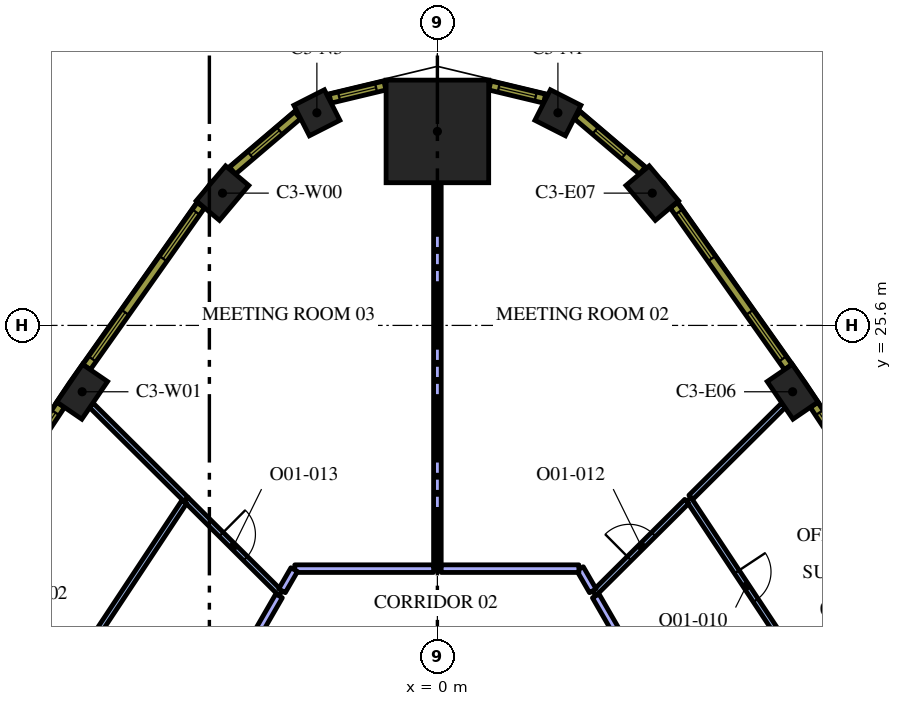
"""IFC4 building model, lengths in metres.
Left out: names, types, materials, properties, quantities, classifications, styles, units other than length and angle.
Written with IfcOpenShell. Run it as: python <this file> out.ifc"""

import sys

from ifc_helpers import new_model, si_unit, direction, frame, frame_2d, origin, origin_2d, place, context, subcontext, project, spatial, rectangle, extrude, element, fill, save


model = new_model("IFC4")
c1 = context("Model", 3, precision=1e-05, world=origin(), true_north=direction((0.0, 1.0)))
c2 = subcontext(c1, "Body", "Model", "MODEL_VIEW")
j1 = project(units=[si_unit("LENGTHUNIT", "METRE"), si_unit("PLANEANGLEUNIT", "RADIAN")], contexts=[c1])
p1 = place(None, origin())
s1 = spatial("IfcSite", under=j1, at=p1, CompositionType="ELEMENT")
p2 = place(p1, origin())
s2 = spatial("IfcBuilding", under=s1, at=p2, CompositionType="ELEMENT")
p3 = place(p2, frame((0.0, 0.0, 150.0)))
s3 = spatial("IfcBuildingStorey", under=s2, at=p3, CompositionType="ELEMENT", Elevation=150.0)
p4 = place(p3, frame((0.0, 30.704, 0.0), z_axis=(0.0, 0.0, 1.0), x_axis=(0.0, 1.0, 0.0)))
e1 = element("IfcColumn", 1, at=p4, inside=s3, PredefinedType="COLUMN", context=c2, shape_type="SweptSolid", body=[
    extrude(rectangle(XDim=2.7, YDim=2.7, at=origin_2d()), origin(), (0.0, 0.0, 1.0), 4.2),
])
for number, where, z_axis, x_axis in (
    (2, (9.348, 23.854, 0.0), (0.0, 0.0, 1.0), (-0.565, 0.825, 0.0)),
    (3, (5.654, 29.081, 0.0), (0.0, 0.0, 1.0), (-0.644, 0.765, 0.0)),
):
    element("IfcColumn", number, at=place(p3, frame(where, z_axis=z_axis, x_axis=x_axis)), inside=s3, PredefinedType="COLUMN", context=c2, shape_type="SweptSolid", body=[
        extrude(rectangle(XDim=1.2, YDim=0.8, at=origin_2d()), origin(), (0.0, 0.0, 1.0), 4.2),
    ])
for number, where, z_axis, x_axis in (
    (4, (3.171, 31.195, 0.0), (0.0, 0.0, 1.0), (-0.891, 0.453, 0.0)),
    (5, (-3.171, 31.195, 0.0), (0.0, 0.0, 1.0), (-0.891, -0.453, 0.0)),
):
    element("IfcColumn", number, at=place(p3, frame(where, z_axis=z_axis, x_axis=x_axis)), inside=s3, PredefinedType="COLUMN", context=c2, shape_type="SweptSolid", body=[
        extrude(rectangle(XDim=0.9, YDim=0.9, at=origin_2d()), origin(), (0.0, 0.0, 1.0), 4.2),
    ])
for number, where, z_axis, x_axis in (
    (6, (-5.654, 29.081, 0.0), (0.0, 0.0, 1.0), (-0.644, -0.765, 0.0)),
    (7, (-9.348, 23.854, 0.0), (0.0, 0.0, 1.0), (-0.565, -0.825, 0.0)),
):
    element("IfcColumn", number, at=place(p3, frame(where, z_axis=z_axis, x_axis=x_axis)), inside=s3, PredefinedType="COLUMN", context=c2, shape_type="SweptSolid", body=[
        extrude(rectangle(XDim=1.2, YDim=0.8, at=origin_2d()), origin(), (0.0, 0.0, 1.0), 4.2),
    ])
p5 = place(p3, frame((6.616, 21.024, 0.0), z_axis=(0.0, 0.0, 1.0), x_axis=(0.551915124006, -0.833900291338, 0.0)))
e8 = element("IfcWall", 8, at=p5, inside=s3, PredefinedType="PARTITIONING", context=c2, shape_type="SweptSolid", body=[
    extrude(rectangle(XDim=5.488, YDim=0.15, at=frame_2d((2.744, 0.0))), origin(), (0.0, 0.0, 1.0), 3.15),
])
p6 = place(p5, frame((2.288, 0.0, 0.0)))
e9 = element("IfcOpeningElement", 9, at=p6, cuts=e8, PredefinedType="OPENING", context=c2, shape_type="SweptSolid", body=[
    extrude(rectangle(XDim=0.9, YDim=2.1, at=frame_2d((0.45, 1.05))), frame((0.0, 0.085, 0.0), z_axis=(0.0, -1.0, 0.0), x_axis=(1.0, 0.0, 0.0)), (0.0, 0.0, 1.0), 0.17),
])
p7 = place(p3, frame((6.67, 21.078, 0.0), z_axis=(0.0, 0.0, 1.0), x_axis=(0.709236178776, 0.704970951681, 0.0)))
e10 = element("IfcWall", 10, at=p7, inside=s3, PredefinedType="PARTITIONING", context=c2, shape_type="SweptSolid", body=[
    extrude(rectangle(XDim=3.434, YDim=0.15, at=frame_2d((1.717, 0.0))), origin(), (0.0, 0.0, 1.0), 3.15),
])
p8 = place(p3, frame((4.128, 18.55, 0.0), z_axis=(0.0, 0.0, 1.0), x_axis=(0.709237676072, 0.704969445324, 0.0)))
e11 = element("IfcWall", 11, at=p8, inside=s3, PredefinedType="PARTITIONING", context=c2, shape_type="SweptSolid", body=[
    extrude(rectangle(XDim=3.432, YDim=0.15, at=frame_2d((1.716, 0.0))), origin(), (0.0, 0.0, 1.0), 3.15),
])
p9 = place(p8, frame((1.3, 0.0, 0.0)))
e12 = element("IfcOpeningElement", 12, at=p9, cuts=e11, PredefinedType="OPENING", context=c2, shape_type="SweptSolid", body=[
    extrude(rectangle(XDim=0.9, YDim=2.1, at=frame_2d((0.45, 1.05))), frame((0.0, 0.085, 0.0), z_axis=(0.0, -1.0, 0.0), x_axis=(1.0, 0.0, 0.0)), (0.0, 0.0, 1.0), 0.17),
])
p10 = place(p3, frame((8.611, 10.785, 0.0), z_axis=(0.0, 0.0, 1.0), x_axis=(-0.499987928593, 0.866032373102, 0.0)))
e13 = element("IfcWall", 13, at=p10, inside=s3, PredefinedType="PARTITIONING", context=c2, shape_type="SweptSolid", body=[
    extrude(rectangle(XDim=8.889, YDim=0.2, at=frame_2d((4.445, 0.0))), origin(), (0.0, 0.0, 1.0), 3.15),
])
p11 = place(p3, frame((0.0, 19.2, 0.0), z_axis=(0.0, 0.0, 1.0), x_axis=(0.0, 1.0, 0.0)))
e14 = element("IfcWall", 14, at=p11, inside=s3, PredefinedType="PARTITIONING", context=c2, shape_type="SweptSolid", body=[
    extrude(rectangle(XDim=10.154, YDim=0.2, at=frame_2d((5.077, 0.0))), origin(), (0.0, 0.0, 1.0), 3.15),
])
p12 = place(p3, frame((4.089, 18.617, 0.0), z_axis=(0.0, 0.0, 1.0), x_axis=(-0.500120377296, 0.865955892764, 0.0)))
e15 = element("IfcWall", 15, at=p12, inside=s3, PredefinedType="PARTITIONING", context=c2, shape_type="SweptSolid", body=[
    extrude(rectangle(XDim=0.673, YDim=0.2, at=frame_2d((0.336, 0.0))), origin(), (0.0, 0.0, 1.0), 3.15),
])
p13 = place(p3, frame((3.723, 19.2, 0.0), z_axis=(0.0, 0.0, 1.0), x_axis=(-1.0, 0.0, 0.0)))
e16 = element("IfcWall", 16, at=p13, inside=s3, PredefinedType="PARTITIONING", context=c2, shape_type="SweptSolid", body=[
    extrude(rectangle(XDim=3.623, YDim=0.2, at=frame_2d((1.812, 0.0))), origin(), (0.0, 0.0, 1.0), 3.15),
])
p14 = place(p3, frame((-6.613, 21.021, 0.0), z_axis=(0.0, 0.0, 1.0), x_axis=(-0.709222036241, 0.704985179497, 0.0)))
e17 = element("IfcWall", 17, at=p14, inside=s3, PredefinedType="PARTITIONING", context=c2, shape_type="SweptSolid", body=[
    extrude(rectangle(XDim=3.515, YDim=0.15, at=frame_2d((1.757, 0.0))), origin(), (0.0, 0.0, 1.0), 3.15),
])
p15 = place(p3, frame((-6.619, 21.027, 0.0), z_axis=(0.0, 0.0, 1.0), x_axis=(0.709188943058, -0.705018470002, 0.0)))
e18 = element("IfcWall", 18, at=p15, inside=s3, PredefinedType="PARTITIONING", context=c2, shape_type="SweptSolid", body=[
    extrude(rectangle(XDim=3.512, YDim=0.15, at=frame_2d((1.756, 0.0))), origin(), (0.0, 0.0, 1.0), 3.15),
])
p16 = place(p15, frame((1.312, 0.0, 0.0)))
e19 = element("IfcOpeningElement", 19, at=p16, cuts=e18, PredefinedType="OPENING", context=c2, shape_type="SweptSolid", body=[
    extrude(rectangle(XDim=0.9, YDim=2.1, at=frame_2d((0.45, 1.05))), frame((0.0, 0.085, 0.0), z_axis=(0.0, -1.0, 0.0), x_axis=(1.0, 0.0, 0.0)), (0.0, 0.0, 1.0), 0.17),
])
p17 = place(p3, frame((-0.1, 19.2, 0.0), z_axis=(0.0, 0.0, 1.0), x_axis=(-1.0, 0.0, 0.0)))
e20 = element("IfcWall", 20, at=p17, inside=s3, PredefinedType="PARTITIONING", context=c2, shape_type="SweptSolid", body=[
    extrude(rectangle(XDim=3.653, YDim=0.2, at=frame_2d((1.826, 0.0))), origin(), (0.0, 0.0, 1.0), 3.15),
])
p18 = place(p3, frame((-3.768, 19.174, 0.0), z_axis=(0.0, 0.0, 1.0), x_axis=(-0.499897828833, -0.8660843843, 0.0)))
e21 = element("IfcWall", 21, at=p18, inside=s3, PredefinedType="PARTITIONING", context=c2, shape_type="SweptSolid", body=[
    extrude(rectangle(XDim=0.643, YDim=0.2, at=frame_2d((0.321, 0.0))), origin(), (0.0, 0.0, 1.0), 3.15),
])
p19 = place(p3, frame((-6.658, 20.96, 0.0), z_axis=(0.0, 0.0, 1.0), x_axis=(-0.551907039463, -0.833905642019, 0.0)))
e22 = element("IfcWall", 22, at=p19, inside=s3, PredefinedType="PARTITIONING", context=c2, shape_type="SweptSolid", body=[
    extrude(rectangle(XDim=5.412, YDim=0.15, at=frame_2d((2.706, 0.0))), origin(), (0.0, 0.0, 1.0), 3.15),
])
p20 = place(p3, frame((-4.167, 18.483, 0.0), z_axis=(0.0, 0.0, 1.0), x_axis=(-0.499974340325, -0.866040217898, 0.0)))
e23 = element("IfcWall", 23, at=p20, inside=s3, PredefinedType="PARTITIONING", context=c2, shape_type="SweptSolid", body=[
    extrude(rectangle(XDim=8.894, YDim=0.2, at=frame_2d((4.447, 0.0))), origin(), (0.0, 0.0, 1.0), 3.15),
])
p21 = place(p3, frame((12.783, 19.171, 0.0), z_axis=(0.0, 0.0, 1.0), x_axis=(-0.551892811511, 0.833915058386, 0.0)))
e24 = element("IfcWall", 24, at=p21, inside=s3, PredefinedType="SOLIDWALL", context=c2, shape_type="SweptSolid", body=[
    extrude(rectangle(XDim=5.204, YDim=0.24, at=frame_2d((2.602, 0.0))), origin(), (0.0, 0.0, 1.0), 3.95),
])
p22 = place(p21, frame((0.248, 0.0, 0.9)))
e25 = element("IfcOpeningElement", 25, at=p22, cuts=e24, PredefinedType="OPENING", context=c2, shape_type="SweptSolid", body=[
    extrude(rectangle(XDim=1.5, YDim=2.55, at=frame_2d((0.75, 1.275))), frame((0.0, 0.13, 0.0), z_axis=(0.0, -1.0, 0.0), x_axis=(1.0, 0.0, 0.0)), (0.0, 0.0, 1.0), 0.26),
])
p23 = place(p21, frame((3.455, 0.0, 0.9)))
e26 = element("IfcOpeningElement", 26, at=p23, cuts=e24, PredefinedType="OPENING", context=c2, shape_type="SweptSolid", body=[
    extrude(rectangle(XDim=1.5, YDim=2.55, at=frame_2d((0.75, 1.275))), frame((0.0, 0.13, 0.0), z_axis=(0.0, -1.0, 0.0), x_axis=(1.0, 0.0, 0.0)), (0.0, 0.0, 1.0), 0.26),
])
p24 = place(p3, frame((9.231, 24.504, 0.0), z_axis=(0.0, 0.0, 1.0), x_axis=(-0.577115207679, 0.816662743772, 0.0)))
e27 = element("IfcWall", 27, at=p24, inside=s3, PredefinedType="SOLIDWALL", context=c2, shape_type="SweptSolid", body=[
    extrude(rectangle(XDim=5.213, YDim=0.24, at=frame_2d((2.606, 0.0))), origin(), (0.0, 0.0, 1.0), 3.95),
])
p25 = place(p24, frame((0.261, 0.0, 0.9)))
e28 = element("IfcOpeningElement", 28, at=p25, cuts=e27, PredefinedType="OPENING", context=c2, shape_type="SweptSolid", body=[
    extrude(rectangle(XDim=1.5, YDim=2.55, at=frame_2d((0.75, 1.275))), frame((0.0, 0.13, 0.0), z_axis=(0.0, -1.0, 0.0), x_axis=(1.0, 0.0, 0.0)), (0.0, 0.0, 1.0), 0.26),
])
p26 = place(p24, frame((3.492, 0.0, 0.9)))
e29 = element("IfcOpeningElement", 29, at=p26, cuts=e27, PredefinedType="OPENING", context=c2, shape_type="SweptSolid", body=[
    extrude(rectangle(XDim=1.5, YDim=2.55, at=frame_2d((0.75, 1.275))), frame((0.0, 0.13, 0.0), z_axis=(0.0, -1.0, 0.0), x_axis=(1.0, 0.0, 0.0)), (0.0, 0.0, 1.0), 0.26),
])
p27 = place(p3, frame((5.392, 29.672, 0.0), z_axis=(0.0, 0.0, 1.0), x_axis=(-0.761419744247, 0.648259186645, 0.0)))
e30 = element("IfcWall", 30, at=p27, inside=s3, PredefinedType="SOLIDWALL", context=c2, shape_type="SweptSolid", body=[
    extrude(rectangle(XDim=2.25, YDim=0.24, at=frame_2d((1.125, 0.0))), origin(), (0.0, 0.0, 1.0), 3.95),
])
p28 = place(p27, frame((0.625, 0.0, 0.9)))
e31 = element("IfcOpeningElement", 31, at=p28, cuts=e30, PredefinedType="OPENING", context=c2, shape_type="SweptSolid", body=[
    extrude(rectangle(XDim=1.0, YDim=2.55, at=frame_2d((0.5, 1.275))), frame((0.0, 0.13, 0.0), z_axis=(0.0, -1.0, 0.0), x_axis=(1.0, 0.0, 0.0)), (0.0, 0.0, 1.0), 0.26),
])
p29 = place(p3, frame((2.821, 31.566, 0.0), z_axis=(0.0, 0.0, 1.0), x_axis=(-0.972479955788, 0.232986556673, 0.0)))
e32 = element("IfcWall", 32, at=p29, inside=s3, PredefinedType="SOLIDWALL", context=c2, shape_type="SweptSolid", body=[
    extrude(rectangle(XDim=1.482, YDim=0.24, at=frame_2d((0.741, 0.0))), origin(), (0.0, 0.0, 1.0), 3.95),
])
p30 = place(p29, frame((0.241, 0.0, 0.9)))
e33 = element("IfcOpeningElement", 33, at=p30, cuts=e32, PredefinedType="OPENING", context=c2, shape_type="SweptSolid", body=[
    extrude(rectangle(XDim=1.0, YDim=2.55, at=frame_2d((0.5, 1.275))), frame((0.0, 0.13, 0.0), z_axis=(0.0, -1.0, 0.0), x_axis=(1.0, 0.0, 0.0)), (0.0, 0.0, 1.0), 0.26),
])
p31 = place(p3, frame((-1.38, 31.912, 0.0), z_axis=(0.0, 0.0, 1.0), x_axis=(-0.972479955788, -0.232986556673, 0.0)))
e34 = element("IfcWall", 34, at=p31, inside=s3, PredefinedType="SOLIDWALL", context=c2, shape_type="SweptSolid", body=[
    extrude(rectangle(XDim=1.482, YDim=0.24, at=frame_2d((0.741, 0.0))), origin(), (0.0, 0.0, 1.0), 3.95),
])
p32 = place(p31, frame((0.241, 0.0, 0.9)))
e35 = element("IfcOpeningElement", 35, at=p32, cuts=e34, PredefinedType="OPENING", context=c2, shape_type="SweptSolid", body=[
    extrude(rectangle(XDim=1.0, YDim=2.55, at=frame_2d((0.5, 1.275))), frame((0.0, 0.13, 0.0), z_axis=(0.0, -1.0, 0.0), x_axis=(1.0, 0.0, 0.0)), (0.0, 0.0, 1.0), 0.26),
])
p33 = place(p3, frame((-3.678, 31.131, 0.0), z_axis=(0.0, 0.0, 1.0), x_axis=(-0.761419744247, -0.648259186645, 0.0)))
e36 = element("IfcWall", 36, at=p33, inside=s3, PredefinedType="SOLIDWALL", context=c2, shape_type="SweptSolid", body=[
    extrude(rectangle(XDim=2.25, YDim=0.24, at=frame_2d((1.125, 0.0))), origin(), (0.0, 0.0, 1.0), 3.95),
])
p34 = place(p33, frame((0.625, 0.0, 0.9)))
e37 = element("IfcOpeningElement", 37, at=p34, cuts=e36, PredefinedType="OPENING", context=c2, shape_type="SweptSolid", body=[
    extrude(rectangle(XDim=1.0, YDim=2.55, at=frame_2d((0.5, 1.275))), frame((0.0, 0.13, 0.0), z_axis=(0.0, -1.0, 0.0), x_axis=(1.0, 0.0, 0.0)), (0.0, 0.0, 1.0), 0.26),
])
p35 = place(p3, frame((-6.223, 28.762, 0.0), z_axis=(0.0, 0.0, 1.0), x_axis=(-0.577115207679, -0.816662743772, 0.0)))
e38 = element("IfcWall", 38, at=p35, inside=s3, PredefinedType="SOLIDWALL", context=c2, shape_type="SweptSolid", body=[
    extrude(rectangle(XDim=5.213, YDim=0.24, at=frame_2d((2.606, 0.0))), origin(), (0.0, 0.0, 1.0), 3.95),
])
p36 = place(p35, frame((0.221, 0.0, 0.9)))
e39 = element("IfcOpeningElement", 39, at=p36, cuts=e38, PredefinedType="OPENING", context=c2, shape_type="SweptSolid", body=[
    extrude(rectangle(XDim=1.5, YDim=2.55, at=frame_2d((0.75, 1.275))), frame((0.0, 0.13, 0.0), z_axis=(0.0, -1.0, 0.0), x_axis=(1.0, 0.0, 0.0)), (0.0, 0.0, 1.0), 0.26),
])
p37 = place(p35, frame((3.452, 0.0, 0.9)))
e40 = element("IfcOpeningElement", 40, at=p37, cuts=e38, PredefinedType="OPENING", context=c2, shape_type="SweptSolid", body=[
    extrude(rectangle(XDim=1.5, YDim=2.55, at=frame_2d((0.75, 1.275))), frame((0.0, 0.13, 0.0), z_axis=(0.0, -1.0, 0.0), x_axis=(1.0, 0.0, 0.0)), (0.0, 0.0, 1.0), 0.26),
])
p38 = place(p3, frame((-9.911, 23.51, 0.0), z_axis=(0.0, 0.0, 1.0), x_axis=(-0.551892811511, -0.833915058386, 0.0)))
e41 = element("IfcWall", 41, at=p38, inside=s3, PredefinedType="SOLIDWALL", context=c2, shape_type="SweptSolid", body=[
    extrude(rectangle(XDim=5.204, YDim=0.24, at=frame_2d((2.602, 0.0))), origin(), (0.0, 0.0, 1.0), 3.95),
])
p39 = place(p38, frame((0.248, 0.0, 0.9)))
e42 = element("IfcOpeningElement", 42, at=p39, cuts=e41, PredefinedType="OPENING", context=c2, shape_type="SweptSolid", body=[
    extrude(rectangle(XDim=1.5, YDim=2.55, at=frame_2d((0.75, 1.275))), frame((0.0, 0.13, 0.0), z_axis=(0.0, -1.0, 0.0), x_axis=(1.0, 0.0, 0.0)), (0.0, 0.0, 1.0), 0.26),
])
p40 = place(p38, frame((3.455, 0.0, 0.9)))
e43 = element("IfcOpeningElement", 43, at=p40, cuts=e41, PredefinedType="OPENING", context=c2, shape_type="SweptSolid", body=[
    extrude(rectangle(XDim=1.5, YDim=2.55, at=frame_2d((0.75, 1.275))), frame((0.0, 0.13, 0.0), z_axis=(0.0, -1.0, 0.0), x_axis=(1.0, 0.0, 0.0)), (0.0, 0.0, 1.0), 0.26),
])
p41 = place(p6, origin())
e44 = element("IfcDoor", 44, at=p41, inside=s3, OperationType="SINGLE_SWING_LEFT", PredefinedType="DOOR", context=c2, shape_type="SweptSolid", body=[
    extrude(rectangle(XDim=0.9, YDim=2.1, at=frame_2d((0.45, 1.05))), frame((0.0, 0.025, 0.0), z_axis=(0.0, -1.0, 0.0), x_axis=(1.0, 0.0, 0.0)), (0.0, 0.0, 1.0), 0.05),
])
fill(e9, e44)
p42 = place(p9, origin())
e45 = element("IfcDoor", 45, at=p42, inside=s3, OperationType="SINGLE_SWING_RIGHT", PredefinedType="DOOR", context=c2, shape_type="SweptSolid", body=[
    extrude(rectangle(XDim=0.9, YDim=2.1, at=frame_2d((0.45, 1.05))), frame((0.0, 0.025, 0.0), z_axis=(0.0, -1.0, 0.0), x_axis=(1.0, 0.0, 0.0)), (0.0, 0.0, 1.0), 0.05),
])
fill(e12, e45)
p43 = place(p16, origin())
e46 = element("IfcDoor", 46, at=p43, inside=s3, OperationType="SINGLE_SWING_RIGHT", PredefinedType="DOOR", context=c2, shape_type="SweptSolid", body=[
    extrude(rectangle(XDim=0.9, YDim=2.1, at=frame_2d((0.45, 1.05))), frame((0.0, 0.025, 0.0), z_axis=(0.0, -1.0, 0.0), x_axis=(1.0, 0.0, 0.0)), (0.0, 0.0, 1.0), 0.05),
])
fill(e19, e46)
p44 = place(p23, origin())
e47 = element("IfcWindow", 47, at=p44, inside=s3, PartitioningType="SINGLE_PANEL", PredefinedType="WINDOW", context=c2, shape_type="SweptSolid", body=[
    extrude(rectangle(XDim=1.5, YDim=2.55, at=frame_2d((0.75, 1.275))), frame((0.0, 0.04, 0.0), z_axis=(0.0, -1.0, 0.0), x_axis=(1.0, 0.0, 0.0)), (0.0, 0.0, 1.0), 0.06),
])
fill(e26, e47)
p45 = place(p25, origin())
e48 = element("IfcWindow", 48, at=p45, inside=s3, PartitioningType="SINGLE_PANEL", PredefinedType="WINDOW", context=c2, shape_type="SweptSolid", body=[
    extrude(rectangle(XDim=1.5, YDim=2.55, at=frame_2d((0.75, 1.275))), frame((0.0, 0.04, 0.0), z_axis=(0.0, -1.0, 0.0), x_axis=(1.0, 0.0, 0.0)), (0.0, 0.0, 1.0), 0.06),
])
fill(e28, e48)
p46 = place(p26, origin())
e49 = element("IfcWindow", 49, at=p46, inside=s3, PartitioningType="SINGLE_PANEL", PredefinedType="WINDOW", context=c2, shape_type="SweptSolid", body=[
    extrude(rectangle(XDim=1.5, YDim=2.55, at=frame_2d((0.75, 1.275))), frame((0.0, 0.04, 0.0), z_axis=(0.0, -1.0, 0.0), x_axis=(1.0, 0.0, 0.0)), (0.0, 0.0, 1.0), 0.06),
])
fill(e29, e49)
p47 = place(p28, origin())
e50 = element("IfcWindow", 50, at=p47, inside=s3, PartitioningType="SINGLE_PANEL", PredefinedType="WINDOW", context=c2, shape_type="SweptSolid", body=[
    extrude(rectangle(XDim=1.0, YDim=2.55, at=frame_2d((0.5, 1.275))), frame((0.0, 0.04, 0.0), z_axis=(0.0, -1.0, 0.0), x_axis=(1.0, 0.0, 0.0)), (0.0, 0.0, 1.0), 0.06),
])
fill(e31, e50)
p48 = place(p30, origin())
e51 = element("IfcWindow", 51, at=p48, inside=s3, PartitioningType="SINGLE_PANEL", PredefinedType="WINDOW", context=c2, shape_type="SweptSolid", body=[
    extrude(rectangle(XDim=1.0, YDim=2.55, at=frame_2d((0.5, 1.275))), frame((0.0, 0.04, 0.0), z_axis=(0.0, -1.0, 0.0), x_axis=(1.0, 0.0, 0.0)), (0.0, 0.0, 1.0), 0.06),
])
fill(e33, e51)
p49 = place(p32, origin())
e52 = element("IfcWindow", 52, at=p49, inside=s3, PartitioningType="SINGLE_PANEL", PredefinedType="WINDOW", context=c2, shape_type="SweptSolid", body=[
    extrude(rectangle(XDim=1.0, YDim=2.55, at=frame_2d((0.5, 1.275))), frame((0.0, 0.04, 0.0), z_axis=(0.0, -1.0, 0.0), x_axis=(1.0, 0.0, 0.0)), (0.0, 0.0, 1.0), 0.06),
])
fill(e35, e52)
p50 = place(p34, origin())
e53 = element("IfcWindow", 53, at=p50, inside=s3, PartitioningType="SINGLE_PANEL", PredefinedType="WINDOW", context=c2, shape_type="SweptSolid", body=[
    extrude(rectangle(XDim=1.0, YDim=2.55, at=frame_2d((0.5, 1.275))), frame((0.0, 0.04, 0.0), z_axis=(0.0, -1.0, 0.0), x_axis=(1.0, 0.0, 0.0)), (0.0, 0.0, 1.0), 0.06),
])
fill(e37, e53)
p51 = place(p36, origin())
e54 = element("IfcWindow", 54, at=p51, inside=s3, PartitioningType="SINGLE_PANEL", PredefinedType="WINDOW", context=c2, shape_type="SweptSolid", body=[
    extrude(rectangle(XDim=1.5, YDim=2.55, at=frame_2d((0.75, 1.275))), frame((0.0, 0.04, 0.0), z_axis=(0.0, -1.0, 0.0), x_axis=(1.0, 0.0, 0.0)), (0.0, 0.0, 1.0), 0.06),
])
fill(e39, e54)
p52 = place(p37, origin())
e55 = element("IfcWindow", 55, at=p52, inside=s3, PartitioningType="SINGLE_PANEL", PredefinedType="WINDOW", context=c2, shape_type="SweptSolid", body=[
    extrude(rectangle(XDim=1.5, YDim=2.55, at=frame_2d((0.75, 1.275))), frame((0.0, 0.04, 0.0), z_axis=(0.0, -1.0, 0.0), x_axis=(1.0, 0.0, 0.0)), (0.0, 0.0, 1.0), 0.06),
])
fill(e40, e55)
p53 = place(p39, origin())
e56 = element("IfcWindow", 56, at=p53, inside=s3, PartitioningType="SINGLE_PANEL", PredefinedType="WINDOW", context=c2, shape_type="SweptSolid", body=[
    extrude(rectangle(XDim=1.5, YDim=2.55, at=frame_2d((0.75, 1.275))), frame((0.0, 0.04, 0.0), z_axis=(0.0, -1.0, 0.0), x_axis=(1.0, 0.0, 0.0)), (0.0, 0.0, 1.0), 0.06),
])
fill(e42, e56)
save(model, sys.argv[1])
